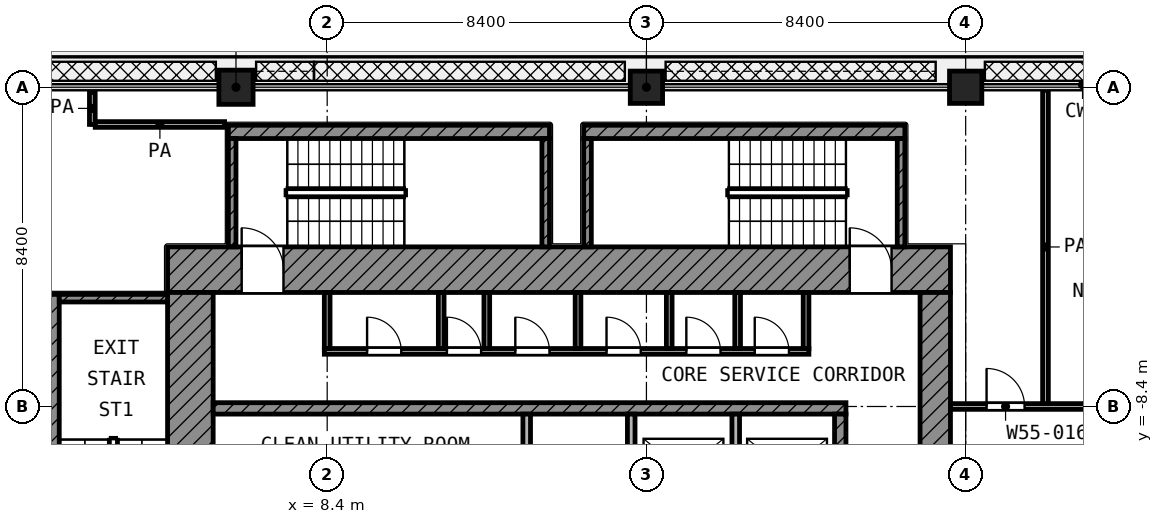
"""IFC4 building model, lengths in metres.
Left out: names, types, materials, properties, quantities, classifications, styles, units other than length and angle.
Written with IfcOpenShell. Run it as: python <this file> out.ifc"""

import sys

from ifc_helpers import new_model, si_unit, direction, frame, frame_2d, origin, origin_2d, place, context, subcontext, project, spatial, rectangle, extrude, element, fill, save


model = new_model("IFC4")
c1 = context("Model", 3, precision=1e-05, world=origin(), true_north=direction((0.0, 1.0)))
c2 = subcontext(c1, "Body", "Model", "MODEL_VIEW")
j1 = project(units=[si_unit("LENGTHUNIT", "METRE"), si_unit("PLANEANGLEUNIT", "RADIAN")], contexts=[c1])
p1 = place(None, origin())
s1 = spatial("IfcSite", under=j1, at=p1, CompositionType="ELEMENT")
p2 = place(p1, origin())
s2 = spatial("IfcBuilding", under=s1, at=p2, CompositionType="ELEMENT")
p3 = place(p2, frame((0.0, 0.0, 239.0)))
s3 = spatial("IfcBuildingStorey", under=s2, at=p3, CompositionType="ELEMENT", Elevation=239.0)
p4 = place(p3, frame((6.0, 0.0, 0.0), z_axis=(0.0, 0.0, 1.0), x_axis=(1.0, 0.0, 0.0)))
e1 = element("IfcColumn", 1, at=p4, inside=s3, PredefinedType="COLUMN", context=c2, shape_type="SweptSolid", body=[
    extrude(rectangle(XDim=0.9, YDim=0.9, at=origin_2d()), origin(), (0.0, 0.0, 1.0), 4.2),
])
for number, where, z_axis, x_axis in (
    (2, (16.8, 0.0, 0.0), (0.0, 0.0, 1.0), (1.0, 0.0, 0.0)),
    (3, (25.2, 0.0, 0.0), (0.0, 0.0, 1.0), (1.0, 0.0, 0.0)),
):
    element("IfcColumn", number, at=place(p3, frame(where, z_axis=z_axis, x_axis=x_axis)), inside=s3, PredefinedType="COLUMN", context=c2, shape_type="SweptSolid", body=[
        extrude(rectangle(XDim=0.85, YDim=0.85, at=origin_2d()), origin(), (0.0, 0.0, 1.0), 4.2),
    ])
p5 = place(p3, frame((4.2, -4.8, 0.0), z_axis=(0.0, 0.0, 1.0), x_axis=(1.0, 0.0, 0.0)))
e4 = element("IfcWall", 4, at=p5, inside=s3, PredefinedType="SHEAR", context=c2, shape_type="SweptSolid", body=[
    extrude(rectangle(XDim=20.6, YDim=1.2, at=frame_2d((10.3, 0.0))), origin(), (0.0, 0.0, 1.0), 3.6),
])
p6 = place(p5, frame((1.95, 0.0, 0.0)))
e5 = element("IfcOpeningElement", 5, at=p6, cuts=e4, PredefinedType="OPENING", context=c2, shape_type="SweptSolid", body=[
    extrude(rectangle(XDim=1.1, YDim=2.1, at=frame_2d((0.55, 1.05))), frame((0.0, 0.61, 0.0), z_axis=(0.0, -1.0, 0.0), x_axis=(1.0, 0.0, 0.0)), (0.0, 0.0, 1.0), 1.22),
])
p7 = place(p5, frame((17.95, 0.0, 0.0)))
e6 = element("IfcOpeningElement", 6, at=p7, cuts=e4, PredefinedType="OPENING", context=c2, shape_type="SweptSolid", body=[
    extrude(rectangle(XDim=1.1, YDim=2.1, at=frame_2d((0.55, 1.05))), frame((0.0, 0.61, 0.0), z_axis=(0.0, -1.0, 0.0), x_axis=(1.0, 0.0, 0.0)), (0.0, 0.0, 1.0), 1.22),
])
p8 = place(p3, frame((4.8, -24.8, 0.0), z_axis=(0.0, 0.0, 1.0), x_axis=(0.0, 1.0, 0.0)))
e7 = element("IfcWall", 7, at=p8, inside=s3, PredefinedType="SHEAR", context=c2, shape_type="SweptSolid", body=[
    extrude(rectangle(XDim=19.4, YDim=1.2, at=frame_2d((9.7, 0.0))), origin(), (0.0, 0.0, 1.0), 3.6),
])
p9 = place(p8, frame((11.25, 0.0, 0.0)))
e8 = element("IfcOpeningElement", 8, at=p9, cuts=e7, PredefinedType="OPENING", context=c2, shape_type="SweptSolid", body=[
    extrude(rectangle(XDim=1.1, YDim=2.1, at=frame_2d((0.55, 1.05))), frame((0.0, 0.61, 0.0), z_axis=(0.0, -1.0, 0.0), x_axis=(1.0, 0.0, 0.0)), (0.0, 0.0, 1.0), 1.22),
])
p10 = place(p8, frame((1.95, 0.0, 0.0)))
e9 = element("IfcOpeningElement", 9, at=p10, cuts=e7, PredefinedType="OPENING", context=c2, shape_type="SweptSolid", body=[
    extrude(rectangle(XDim=1.1, YDim=2.1, at=frame_2d((0.55, 1.05))), frame((0.0, 0.61, 0.0), z_axis=(0.0, -1.0, 0.0), x_axis=(1.0, 0.0, 0.0)), (0.0, 0.0, 1.0), 1.22),
])
p11 = place(p3, frame((24.4, -24.0, 0.0), z_axis=(0.0, 0.0, 1.0), x_axis=(0.0, 1.0, 0.0)))
e10 = element("IfcWall", 10, at=p11, inside=s3, PredefinedType="SHEAR", context=c2, shape_type="SweptSolid", body=[
    extrude(rectangle(XDim=18.6, YDim=0.8, at=frame_2d((9.3, 0.0))), origin(), (0.0, 0.0, 1.0), 3.6),
])
p12 = place(p11, frame((10.5, 0.0, 0.0)))
e11 = element("IfcOpeningElement", 11, at=p12, cuts=e10, PredefinedType="OPENING", context=c2, shape_type="SweptSolid", body=[
    extrude(rectangle(XDim=1.8, YDim=2.1, at=frame_2d((0.9, 1.05))), frame((0.0, 0.41, 0.0), z_axis=(0.0, -1.0, 0.0), x_axis=(1.0, 0.0, 0.0)), (0.0, 0.0, 1.0), 0.82),
])
p13 = place(p3, frame((5.4, -8.45, 0.0), z_axis=(0.0, 0.0, 1.0), x_axis=(1.0, 0.0, 0.0)))
e12 = element("IfcWall", 12, at=p13, inside=s3, PredefinedType="SHEAR", context=c2, shape_type="SweptSolid", body=[
    extrude(rectangle(XDim=16.65, YDim=0.3, at=frame_2d((8.325, 0.0))), origin(), (0.0, 0.0, 1.0), 3.6),
])
p14 = place(p3, frame((21.9, -10.95, 0.0), z_axis=(0.0, 0.0, 1.0), x_axis=(0.0, 1.0, 0.0)))
e13 = element("IfcWall", 13, at=p14, inside=s3, PredefinedType="SHEAR", context=c2, shape_type="SweptSolid", body=[
    extrude(rectangle(XDim=2.35, YDim=0.3, at=frame_2d((1.175, 0.0))), origin(), (0.0, 0.0, 1.0), 3.6),
])
for number, where, z_axis, x_axis in (
    (14, (13.65, -10.95, 0.0), (0.0, 0.0, 1.0), (0.0, 1.0, 0.0)),
    (15, (16.4, -10.95, 0.0), (0.0, 0.0, 1.0), (0.0, 1.0, 0.0)),
    (16, (19.15, -10.95, 0.0), (0.0, 0.0, 1.0), (0.0, 1.0, 0.0)),
):
    element("IfcWall", number, at=place(p3, frame(where, z_axis=z_axis, x_axis=x_axis)), inside=s3, PredefinedType="PARTITIONING", context=c2, shape_type="SweptSolid", body=[
        extrude(rectangle(XDim=2.35, YDim=0.2, at=frame_2d((1.175, 0.0))), origin(), (0.0, 0.0, 1.0), 3.6),
    ])
p15 = place(p3, frame((8.325, -6.95, 0.0), z_axis=(0.0, 0.0, 1.0), x_axis=(1.0, 0.0, 0.0)))
e17 = element("IfcWall", 17, at=p15, inside=s3, PredefinedType="PARTITIONING", context=c2, shape_type="SweptSolid", body=[
    extrude(rectangle(XDim=12.75, YDim=0.15, at=frame_2d((6.375, 0.0))), origin(), (0.0, 0.0, 1.0), 3.6),
])
p16 = place(p15, frame((1.125, 0.0, 0.0)))
e18 = element("IfcOpeningElement", 18, at=p16, cuts=e17, PredefinedType="OPENING", context=c2, shape_type="SweptSolid", body=[
    extrude(rectangle(XDim=0.9, YDim=2.1, at=frame_2d((0.45, 1.05))), frame((0.0, 0.085, 0.0), z_axis=(0.0, -1.0, 0.0), x_axis=(1.0, 0.0, 0.0)), (0.0, 0.0, 1.0), 0.17),
])
p17 = place(p15, frame((3.225, 0.0, 0.0)))
e19 = element("IfcOpeningElement", 19, at=p17, cuts=e17, PredefinedType="OPENING", context=c2, shape_type="SweptSolid", body=[
    extrude(rectangle(XDim=0.9, YDim=2.1, at=frame_2d((0.45, 1.05))), frame((0.0, 0.085, 0.0), z_axis=(0.0, -1.0, 0.0), x_axis=(1.0, 0.0, 0.0)), (0.0, 0.0, 1.0), 0.17),
])
p18 = place(p15, frame((5.025, 0.0, 0.0)))
e20 = element("IfcOpeningElement", 20, at=p18, cuts=e17, PredefinedType="OPENING", context=c2, shape_type="SweptSolid", body=[
    extrude(rectangle(XDim=0.9, YDim=2.1, at=frame_2d((0.45, 1.05))), frame((0.0, 0.085, 0.0), z_axis=(0.0, -1.0, 0.0), x_axis=(1.0, 0.0, 0.0)), (0.0, 0.0, 1.0), 0.17),
])
p19 = place(p15, frame((7.425, 0.0, 0.0)))
e21 = element("IfcOpeningElement", 21, at=p19, cuts=e17, PredefinedType="OPENING", context=c2, shape_type="SweptSolid", body=[
    extrude(rectangle(XDim=0.9, YDim=2.1, at=frame_2d((0.45, 1.05))), frame((0.0, 0.085, 0.0), z_axis=(0.0, -1.0, 0.0), x_axis=(1.0, 0.0, 0.0)), (0.0, 0.0, 1.0), 0.17),
])
p20 = place(p15, frame((9.525, 0.0, 0.0)))
e22 = element("IfcOpeningElement", 22, at=p20, cuts=e17, PredefinedType="OPENING", context=c2, shape_type="SweptSolid", body=[
    extrude(rectangle(XDim=0.9, YDim=2.1, at=frame_2d((0.45, 1.05))), frame((0.0, 0.085, 0.0), z_axis=(0.0, -1.0, 0.0), x_axis=(1.0, 0.0, 0.0)), (0.0, 0.0, 1.0), 0.17),
])
p21 = place(p15, frame((11.325, 0.0, 0.0)))
e23 = element("IfcOpeningElement", 23, at=p21, cuts=e17, PredefinedType="OPENING", context=c2, shape_type="SweptSolid", body=[
    extrude(rectangle(XDim=0.9, YDim=2.1, at=frame_2d((0.45, 1.05))), frame((0.0, 0.085, 0.0), z_axis=(0.0, -1.0, 0.0), x_axis=(1.0, 0.0, 0.0)), (0.0, 0.0, 1.0), 0.17),
])
for number, where, z_axis, x_axis in (
    (24, (8.4, -6.875, 0.0), (0.0, 0.0, 1.0), (0.0, 1.0, 0.0)),
    (25, (11.4, -6.875, 0.0), (0.0, 0.0, 1.0), (0.0, 1.0, 0.0)),
    (26, (12.6, -6.875, 0.0), (0.0, 0.0, 1.0), (0.0, 1.0, 0.0)),
    (27, (15.0, -6.875, 0.0), (0.0, 0.0, 1.0), (0.0, 1.0, 0.0)),
    (28, (17.4, -6.875, 0.0), (0.0, 0.0, 1.0), (0.0, 1.0, 0.0)),
    (29, (19.2, -6.875, 0.0), (0.0, 0.0, 1.0), (0.0, 1.0, 0.0)),
    (30, (21.0, -6.875, 0.0), (0.0, 0.0, 1.0), (0.0, 1.0, 0.0)),
):
    element("IfcWall", number, at=place(p3, frame(where, z_axis=z_axis, x_axis=x_axis)), inside=s3, PredefinedType="PARTITIONING", context=c2, shape_type="SweptSolid", body=[
        extrude(rectangle(XDim=1.475, YDim=0.15, at=frame_2d((0.738, 0.0))), origin(), (0.0, 0.0, 1.0), 3.6),
    ])
p22 = place(p3, frame((1.175, -13.9, 0.0), z_axis=(0.0, 0.0, 1.0), x_axis=(0.0, 1.0, 0.0)))
e31 = element("IfcWall", 31, at=p22, inside=s3, PredefinedType="SHEAR", context=c2, shape_type="SweptSolid", body=[
    extrude(rectangle(XDim=8.45, YDim=0.35, at=frame_2d((4.225, 0.0))), origin(), (0.0, 0.0, 1.0), 3.6),
])
p23 = place(p3, frame((1.35, -5.55, 0.0), z_axis=(0.0, 0.0, 1.0), x_axis=(1.0, 0.0, 0.0)))
e32 = element("IfcWall", 32, at=p23, inside=s3, PredefinedType="SHEAR", context=c2, shape_type="SweptSolid", body=[
    extrude(rectangle(XDim=2.85, YDim=0.2, at=frame_2d((1.425, 0.0))), origin(), (0.0, 0.0, 1.0), 3.6),
])
p24 = place(p3, frame((5.8, -1.175, 0.0), z_axis=(0.0, 0.0, 1.0), x_axis=(1.0, 0.0, 0.0)))
e33 = element("IfcWall", 33, at=p24, inside=s3, PredefinedType="SHEAR", context=c2, shape_type="SweptSolid", body=[
    extrude(rectangle(XDim=8.45, YDim=0.35, at=frame_2d((4.225, 0.0))), origin(), (0.0, 0.0, 1.0), 3.6),
])
for number, where, z_axis, x_axis in (
    (34, (5.9, -4.2, 0.0), (0.0, 0.0, 1.0), (0.0, 1.0, 0.0)),
    (35, (14.15, -4.2, 0.0), (0.0, 0.0, 1.0), (0.0, 1.0, 0.0)),
):
    element("IfcWall", number, at=place(p3, frame(where, z_axis=z_axis, x_axis=x_axis)), inside=s3, PredefinedType="SHEAR", context=c2, shape_type="SweptSolid", body=[
        extrude(rectangle(XDim=2.85, YDim=0.2, at=frame_2d((1.425, 0.0))), origin(), (0.0, 0.0, 1.0), 3.6),
    ])
p25 = place(p3, frame((15.15, -1.175, 0.0), z_axis=(0.0, 0.0, 1.0), x_axis=(1.0, 0.0, 0.0)))
e36 = element("IfcWall", 36, at=p25, inside=s3, PredefinedType="SHEAR", context=c2, shape_type="SweptSolid", body=[
    extrude(rectangle(XDim=8.45, YDim=0.35, at=frame_2d((4.225, 0.0))), origin(), (0.0, 0.0, 1.0), 3.6),
])
for number, where, z_axis, x_axis in (
    (37, (15.25, -4.2, 0.0), (0.0, 0.0, 1.0), (0.0, 1.0, 0.0)),
    (38, (23.5, -4.2, 0.0), (0.0, 0.0, 1.0), (0.0, 1.0, 0.0)),
):
    element("IfcWall", number, at=place(p3, frame(where, z_axis=z_axis, x_axis=x_axis)), inside=s3, PredefinedType="SHEAR", context=c2, shape_type="SweptSolid", body=[
        extrude(rectangle(XDim=2.85, YDim=0.2, at=frame_2d((1.425, 0.0))), origin(), (0.0, 0.0, 1.0), 3.6),
    ])
p26 = place(p3, frame((24.8, -8.4, 0.0), z_axis=(0.0, 0.0, 1.0), x_axis=(1.0, 0.0, 0.0)))
e39 = element("IfcWall", 39, at=p26, inside=s3, PredefinedType="PARTITIONING", context=c2, shape_type="SweptSolid", body=[
    extrude(rectangle(XDim=15.432, YDim=0.15, at=frame_2d((7.716, 0.0))), origin(), (0.0, 0.0, 1.0), 3.6),
])
p27 = place(p26, frame((9.3, 0.0, 0.0)))
e40 = element("IfcOpeningElement", 40, at=p27, cuts=e39, PredefinedType="OPENING", context=c2, shape_type="SweptSolid", body=[
    extrude(rectangle(XDim=1.1, YDim=2.1, at=frame_2d((0.55, 1.05))), frame((0.0, 0.085, 0.0), z_axis=(0.0, -1.0, 0.0), x_axis=(1.0, 0.0, 0.0)), (0.0, 0.0, 1.0), 0.17),
])
p28 = place(p26, frame((0.95, 0.0, 0.0)))
e41 = element("IfcOpeningElement", 41, at=p28, cuts=e39, PredefinedType="OPENING", context=c2, shape_type="SweptSolid", body=[
    extrude(rectangle(XDim=1.0, YDim=2.1, at=frame_2d((0.5, 1.05))), frame((0.0, 0.085, 0.0), z_axis=(0.0, -1.0, 0.0), x_axis=(1.0, 0.0, 0.0)), (0.0, 0.0, 1.0), 0.17),
])
p29 = place(p26, frame((5.05, 0.0, 0.0)))
e42 = element("IfcOpeningElement", 42, at=p29, cuts=e39, PredefinedType="OPENING", context=c2, shape_type="SweptSolid", body=[
    extrude(rectangle(XDim=1.2, YDim=2.1, at=frame_2d((0.6, 1.05))), frame((0.0, 0.085, 0.0), z_axis=(0.0, -1.0, 0.0), x_axis=(1.0, 0.0, 0.0)), (0.0, 0.0, 1.0), 0.17),
])
p30 = place(p3, frame((2.297, -0.98, 0.0), z_axis=(0.0, 0.0, 1.0), x_axis=(1.0, 0.0, 0.0)))
e43 = element("IfcWall", 43, at=p30, inside=s3, PredefinedType="PARTITIONING", context=c2, shape_type="SweptSolid", body=[
    extrude(rectangle(XDim=3.403, YDim=0.15, at=frame_2d((1.701, 0.0))), origin(), (0.0, 0.0, 1.0), 3.6),
])
p31 = place(p3, frame((2.22, -0.978, 0.0), z_axis=(0.0, 0.0, 1.0), x_axis=(0.0, 1.0, 0.0)))
e44 = element("IfcWall", 44, at=p31, inside=s3, PredefinedType="PARTITIONING", context=c2, shape_type="SweptSolid", body=[
    extrude(rectangle(XDim=0.843, YDim=0.15, at=frame_2d((0.421, 0.0))), origin(), (0.0, 0.0, 1.0), 3.6),
])
p32 = place(p3, frame((27.3, -8.325, 0.0), z_axis=(0.0, 0.0, 1.0), x_axis=(0.0, 1.0, 0.0)))
e45 = element("IfcWall", 45, at=p32, inside=s3, PredefinedType="PARTITIONING", context=c2, shape_type="SweptSolid", body=[
    extrude(rectangle(XDim=8.245, YDim=0.15, at=frame_2d((4.123, 0.0))), origin(), (0.0, 0.0, 1.0), 3.6),
])
p33 = place(p6, origin())
e46 = element("IfcDoor", 46, at=p33, inside=s3, OperationType="SINGLE_SWING_LEFT", PredefinedType="DOOR", context=c2, shape_type="SweptSolid", body=[
    extrude(rectangle(XDim=1.1, YDim=2.1, at=frame_2d((0.55, 1.05))), frame((0.0, 0.025, 0.0), z_axis=(0.0, -1.0, 0.0), x_axis=(1.0, 0.0, 0.0)), (0.0, 0.0, 1.0), 0.05),
])
fill(e5, e46)
p34 = place(p7, origin())
e47 = element("IfcDoor", 47, at=p34, inside=s3, OperationType="SINGLE_SWING_LEFT", PredefinedType="DOOR", context=c2, shape_type="SweptSolid", body=[
    extrude(rectangle(XDim=1.1, YDim=2.1, at=frame_2d((0.55, 1.05))), frame((0.0, 0.025, 0.0), z_axis=(0.0, -1.0, 0.0), x_axis=(1.0, 0.0, 0.0)), (0.0, 0.0, 1.0), 0.05),
])
fill(e6, e47)
p35 = place(p16, origin())
e48 = element("IfcDoor", 48, at=p35, inside=s3, OperationType="SINGLE_SWING_LEFT", PredefinedType="DOOR", context=c2, shape_type="SweptSolid", body=[
    extrude(rectangle(XDim=0.9, YDim=2.1, at=frame_2d((0.45, 1.05))), frame((0.0, 0.025, 0.0), z_axis=(0.0, -1.0, 0.0), x_axis=(1.0, 0.0, 0.0)), (0.0, 0.0, 1.0), 0.05),
])
fill(e18, e48)
p36 = place(p17, origin())
e49 = element("IfcDoor", 49, at=p36, inside=s3, OperationType="SINGLE_SWING_LEFT", PredefinedType="DOOR", context=c2, shape_type="SweptSolid", body=[
    extrude(rectangle(XDim=0.9, YDim=2.1, at=frame_2d((0.45, 1.05))), frame((0.0, 0.025, 0.0), z_axis=(0.0, -1.0, 0.0), x_axis=(1.0, 0.0, 0.0)), (0.0, 0.0, 1.0), 0.05),
])
fill(e19, e49)
p37 = place(p18, origin())
e50 = element("IfcDoor", 50, at=p37, inside=s3, OperationType="SINGLE_SWING_LEFT", PredefinedType="DOOR", context=c2, shape_type="SweptSolid", body=[
    extrude(rectangle(XDim=0.9, YDim=2.1, at=frame_2d((0.45, 1.05))), frame((0.0, 0.025, 0.0), z_axis=(0.0, -1.0, 0.0), x_axis=(1.0, 0.0, 0.0)), (0.0, 0.0, 1.0), 0.05),
])
fill(e20, e50)
p38 = place(p19, origin())
e51 = element("IfcDoor", 51, at=p38, inside=s3, OperationType="SINGLE_SWING_LEFT", PredefinedType="DOOR", context=c2, shape_type="SweptSolid", body=[
    extrude(rectangle(XDim=0.9, YDim=2.1, at=frame_2d((0.45, 1.05))), frame((0.0, 0.025, 0.0), z_axis=(0.0, -1.0, 0.0), x_axis=(1.0, 0.0, 0.0)), (0.0, 0.0, 1.0), 0.05),
])
fill(e21, e51)
p39 = place(p20, origin())
e52 = element("IfcDoor", 52, at=p39, inside=s3, OperationType="SINGLE_SWING_LEFT", PredefinedType="DOOR", context=c2, shape_type="SweptSolid", body=[
    extrude(rectangle(XDim=0.9, YDim=2.1, at=frame_2d((0.45, 1.05))), frame((0.0, 0.025, 0.0), z_axis=(0.0, -1.0, 0.0), x_axis=(1.0, 0.0, 0.0)), (0.0, 0.0, 1.0), 0.05),
])
fill(e22, e52)
p40 = place(p21, origin())
e53 = element("IfcDoor", 53, at=p40, inside=s3, OperationType="SINGLE_SWING_LEFT", PredefinedType="DOOR", context=c2, shape_type="SweptSolid", body=[
    extrude(rectangle(XDim=0.9, YDim=2.1, at=frame_2d((0.45, 1.05))), frame((0.0, 0.025, 0.0), z_axis=(0.0, -1.0, 0.0), x_axis=(1.0, 0.0, 0.0)), (0.0, 0.0, 1.0), 0.05),
])
fill(e23, e53)
p41 = place(p28, origin())
e54 = element("IfcDoor", 54, at=p41, inside=s3, OperationType="SINGLE_SWING_LEFT", PredefinedType="DOOR", context=c2, shape_type="SweptSolid", body=[
    extrude(rectangle(XDim=1.0, YDim=2.1, at=frame_2d((0.5, 1.05))), frame((0.0, 0.025, 0.0), z_axis=(0.0, -1.0, 0.0), x_axis=(1.0, 0.0, 0.0)), (0.0, 0.0, 1.0), 0.05),
])
fill(e41, e54)
save(model, sys.argv[1])
